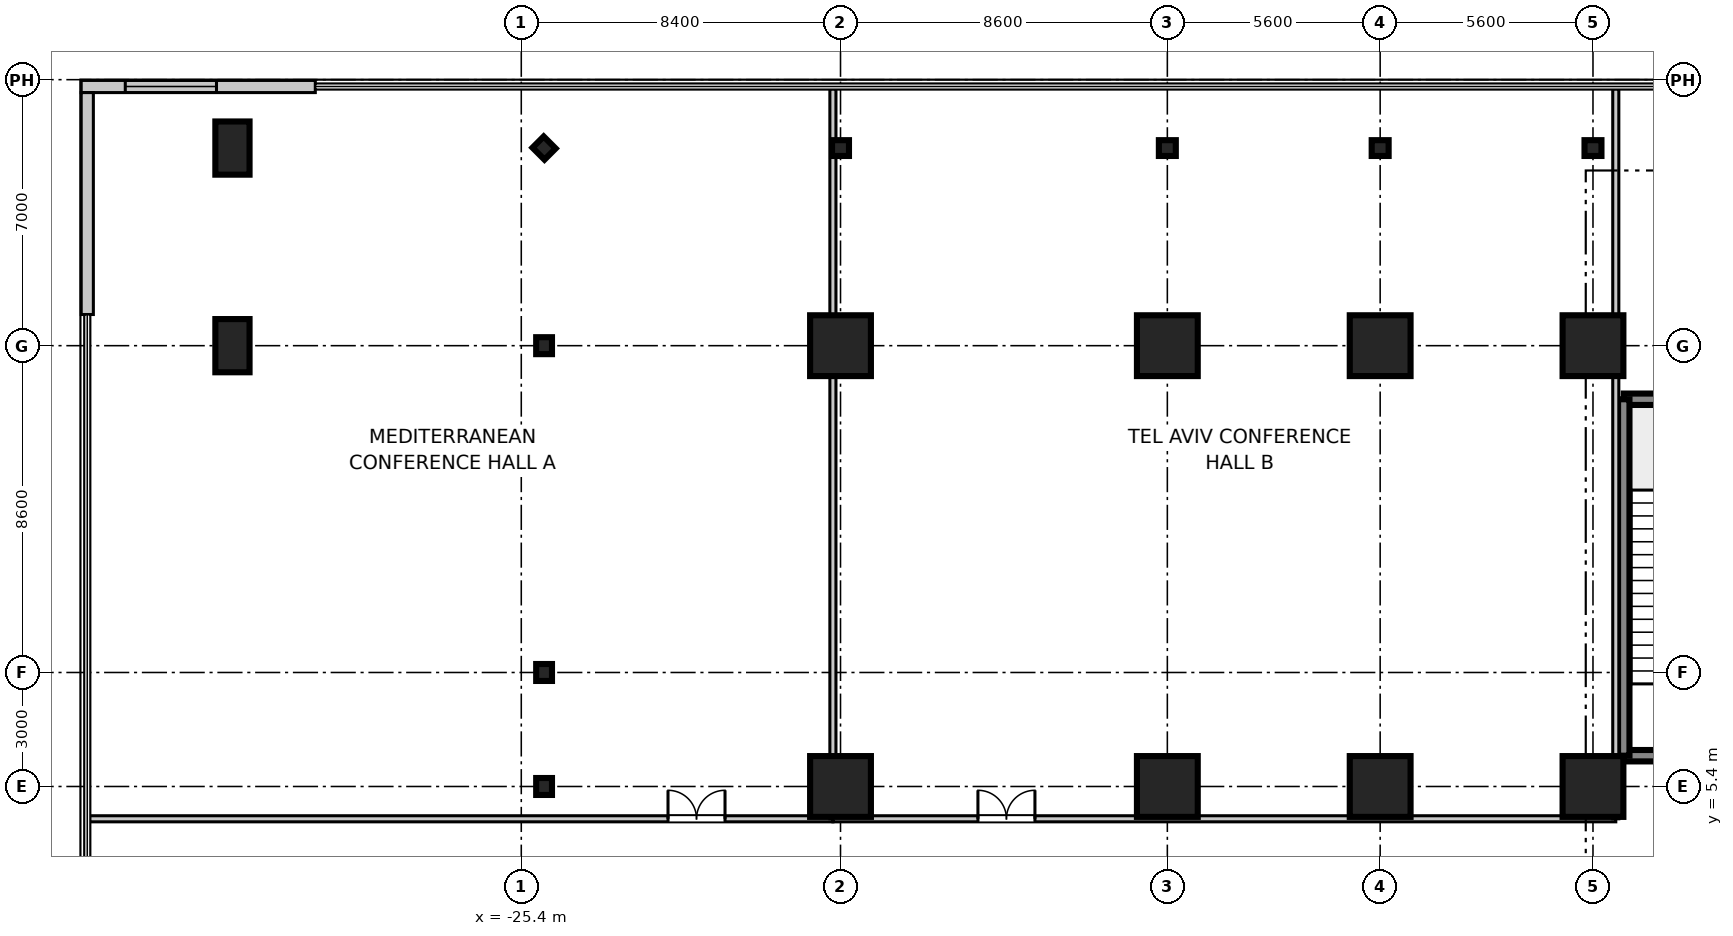
"""IFC4 building model, lengths in metres.
Left out: names, types, materials, properties, quantities, classifications, styles, units other than length and angle.
Written with IfcOpenShell. Run it as: python <this file> out.ifc"""

import sys

from ifc_helpers import new_model, si_unit, direction, frame, frame_2d, origin, origin_2d, place, context, subcontext, project, spatial, rectangle, i_section, extrude, source, transform, mapped, element, fill, save


model = new_model("IFC4")
c1 = context("Model", 3, precision=1e-05, world=origin(), true_north=direction((0.0, 1.0)))
c2 = subcontext(c1, "Body", "Model", "MODEL_VIEW")
j1 = project(units=[si_unit("LENGTHUNIT", "METRE"), si_unit("PLANEANGLEUNIT", "RADIAN")], contexts=[c1])
p1 = place(None, origin())
s1 = spatial("IfcSite", under=j1, at=p1, CompositionType="ELEMENT")
p2 = place(p1, origin())
s2 = spatial("IfcBuilding", under=s1, at=p2, CompositionType="ELEMENT")
p3 = place(p2, frame((0.0, 0.0, 10.8)))
s3 = spatial("IfcBuildingStorey", under=s2, at=p3, CompositionType="ELEMENT", Elevation=10.8)
m1 = source(origin(), c2, "Body", "SweptSolid", [
    extrude(rectangle(XDim=1.6, YDim=1.6, at=origin_2d()), origin(), (0.0, 0.0, 1.0), 5.355),
])
for number, where, z_axis, x_axis in (
    (1, (-17.0, 5.4, 0.0), (0.0, 0.0, 1.0), (1.0, 0.0, 0.0)),
    (2, (-17.0, 17.0, 0.0), (0.0, 0.0, 1.0), (1.0, 0.0, 0.0)),
    (3, (-8.4, 5.4, 0.0), (0.0, 0.0, 1.0), (1.0, 0.0, 0.0)),
    (4, (-8.4, 17.0, 0.0), (0.0, 0.0, 1.0), (1.0, 0.0, 0.0)),
    (5, (-2.8, 5.4, 0.0), (0.0, 0.0, 1.0), (1.0, 0.0, 0.0)),
    (6, (-2.8, 17.0, 0.0), (0.0, 0.0, 1.0), (1.0, 0.0, 0.0)),
    (7, (2.8, 5.4, 0.0), (0.0, 0.0, 1.0), (1.0, 0.0, 0.0)),
    (8, (2.8, 17.0, 0.0), (0.0, 0.0, 1.0), (1.0, 0.0, 0.0)),
):
    element("IfcColumn", number, at=place(p3, frame(where, z_axis=z_axis, x_axis=x_axis)), inside=s3, PredefinedType="COLUMN", context=c2, shape_type="MappedRepresentation", body=[
        mapped(m1, transform((0.0, 0.0, 0.0), scale=1.0)),
    ])
m2 = source(origin(), c2, "Body", "SweptSolid", [
    extrude(rectangle(XDim=0.9, YDim=1.4, at=origin_2d()), origin(), (0.0, 0.0, 1.0), 5.355),
])
for number, where, z_axis, x_axis in (
    (9, (-33.0, 17.0, 0.0), (0.0, 0.0, 1.0), (1.0, 0.0, 0.0)),
    (10, (-33.0, 22.2, 0.0), (0.0, 0.0, 1.0), (1.0, 0.0, 0.0)),
):
    element("IfcColumn", number, at=place(p3, frame(where, z_axis=z_axis, x_axis=x_axis)), inside=s3, PredefinedType="PILASTER", context=c2, shape_type="MappedRepresentation", body=[
        mapped(m2, transform((0.0, 0.0, 0.0), scale=1.0)),
    ])
m3 = source(origin(), c2, "Body", "SweptSolid", [
    extrude(i_section(OverallWidth=0.416, OverallDepth=0.446, WebThickness=0.025, FlangeThickness=0.04, at=origin_2d()), origin(), (0.0, 0.0, 1.0), 5.355),
])
for number, where, z_axis, x_axis in (
    (11, (-24.8, 5.4, 0.0), (0.0, 0.0, 1.0), (1.0, 0.0, 0.0)),
    (12, (-24.8, 8.4, 0.0), (0.0, 0.0, 1.0), (1.0, 0.0, 0.0)),
    (13, (-24.8, 17.0, 0.0), (0.0, 0.0, 1.0), (1.0, 0.0, 0.0)),
    (14, (-17.0, 22.2, 0.0), (0.0, 0.0, 1.0), (0.0, 1.0, 0.0)),
    (15, (-8.4, 22.2, 0.0), (0.0, 0.0, 1.0), (0.0, 1.0, 0.0)),
    (16, (-2.8, 22.2, 0.0), (0.0, 0.0, 1.0), (0.0, 1.0, 0.0)),
    (17, (2.8, 22.2, 0.0), (0.0, 0.0, 1.0), (0.0, 1.0, 0.0)),
    (18, (-24.8, 22.2, 0.0), (0.0, 0.0, 1.0), (0.707, 0.707, 0.0)),
):
    element("IfcColumn", number, at=place(p3, frame(where, z_axis=z_axis, x_axis=x_axis)), inside=s3, PredefinedType="COLUMN", context=c2, shape_type="MappedRepresentation", body=[
        mapped(m3, transform((0.0, 0.0, 0.0), scale=1.0)),
    ])
m4 = source(origin(), c2, "Body", "SweptSolid", [
    extrude(rectangle(XDim=3.98, YDim=0.3, at=frame_2d((1.99, 0.0))), origin(), (0.0, 0.0, 1.0), 5.06),
])
for number, where, z_axis, x_axis in (
    (19, (3.61, 6.21, 0.0), (0.0, 0.0, 1.0), (1.0, 0.0, 0.0)),
    (20, (3.61, 15.59, 0.0), (0.0, 0.0, 1.0), (1.0, 0.0, 0.0)),
):
    element("IfcWall", number, at=place(p3, frame(where, z_axis=z_axis, x_axis=x_axis)), inside=s3, PredefinedType="SHEAR", context=c2, shape_type="MappedRepresentation", body=[
        mapped(m4, transform((0.0, 0.0, 0.0), scale=1.0)),
    ])
m5 = source(origin(), c2, "Body", "SweptSolid", [
    extrude(rectangle(XDim=9.38, YDim=0.3, at=frame_2d((4.69, 0.0))), origin(), (0.0, 0.0, 1.0), 5.06),
])
p4 = place(p3, frame((3.61, 6.21, 0.0), z_axis=(0.0, 0.0, 1.0), x_axis=(0.0, 1.0, 0.0)))
e21 = element("IfcWall", 21, at=p4, inside=s3, PredefinedType="SHEAR", context=c2, shape_type="MappedRepresentation", body=[
    mapped(m5, transform((0.0, 0.0, 0.0), scale=1.0)),
])
m6 = source(origin(), c2, "Body", "SweptSolid", [
    extrude(rectangle(XDim=6.16, YDim=0.32, at=frame_2d((3.08, 0.0))), origin(), (0.0, 0.0, 1.0), 5.06),
])
p5 = place(p3, frame((-36.98, 23.82, 0.0), z_axis=(0.0, 0.0, 1.0), x_axis=(1.0, 0.0, 0.0)))
e22 = element("IfcWall", 22, at=p5, inside=s3, PredefinedType="STANDARD", context=c2, shape_type="MappedRepresentation", body=[
    mapped(m6, transform((0.0, 0.0, 0.0), scale=1.0)),
])
p6 = place(p5, frame((1.16, 0.0, 0.9)))
e23 = element("IfcOpeningElement", 23, at=p6, cuts=e22, PredefinedType="OPENING", context=c2, shape_type="SweptSolid", body=[
    extrude(rectangle(XDim=2.4, YDim=2.2, at=frame_2d((1.2, 1.1))), frame((0.0, 0.17, 0.0), z_axis=(0.0, -1.0, 0.0), x_axis=(1.0, 0.0, 0.0)), (0.0, 0.0, 1.0), 0.34),
])
m7 = source(origin(), c2, "Body", "SweptSolid", [
    extrude(rectangle(XDim=5.84, YDim=0.32, at=frame_2d((2.92, 0.0))), origin(), (0.0, 0.0, 1.0), 5.06),
])
p7 = place(p3, frame((-36.82, 17.82, 0.0), z_axis=(0.0, 0.0, 1.0), x_axis=(0.0, 1.0, 0.0)))
e24 = element("IfcWall", 24, at=p7, inside=s3, PredefinedType="STANDARD", context=c2, shape_type="MappedRepresentation", body=[
    mapped(m7, transform((0.0, 0.0, 0.0), scale=1.0)),
])
m8 = source(origin(), c2, "Body", "SweptSolid", [
    extrude(rectangle(XDim=19.56, YDim=0.16, at=frame_2d((9.78, 0.0))), origin(), (0.0, 0.0, 1.0), 3.4),
])
p8 = place(p3, frame((-36.76, 4.55, 0.0), z_axis=(0.0, 0.0, 1.0), x_axis=(1.0, 0.0, 0.0)))
e25 = element("IfcWall", 25, at=p8, inside=s3, PredefinedType="PARTITIONING", context=c2, shape_type="MappedRepresentation", body=[
    mapped(m8, transform((0.0, 0.0, 0.0), scale=1.0)),
])
p9 = place(p8, frame((15.221, 0.0, 0.0)))
e26 = element("IfcOpeningElement", 26, at=p9, cuts=e25, PredefinedType="OPENING", context=c2, shape_type="SweptSolid", body=[
    extrude(rectangle(XDim=1.5, YDim=2.15, at=frame_2d((0.75, 1.075))), frame((0.0, 0.09, 0.0), z_axis=(0.0, -1.0, 0.0), x_axis=(1.0, 0.0, 0.0)), (0.0, 0.0, 1.0), 0.18),
])
m9 = source(origin(), c2, "Body", "SweptSolid", [
    extrude(rectangle(XDim=19.21, YDim=0.16, at=frame_2d((9.605, 0.0))), origin(), (0.0, 0.0, 1.0), 3.4),
])
p10 = place(p3, frame((-17.2, 4.55, 0.0), z_axis=(0.0, 0.0, 1.0), x_axis=(0.0, 1.0, 0.0)))
e27 = element("IfcWall", 27, at=p10, inside=s3, PredefinedType="PARTITIONING", context=c2, shape_type="MappedRepresentation", body=[
    mapped(m9, transform((0.0, 0.0, 0.0), scale=1.0)),
])
m10 = source(origin(), c2, "Body", "SweptSolid", [
    extrude(rectangle(XDim=20.6, YDim=0.16, at=frame_2d((10.3, 0.0))), origin(), (0.0, 0.0, 1.0), 3.4),
])
p11 = place(p3, frame((-17.2, 4.55, 0.0), z_axis=(0.0, 0.0, 1.0), x_axis=(1.0, 0.0, 0.0)))
e28 = element("IfcWall", 28, at=p11, inside=s3, PredefinedType="PARTITIONING", context=c2, shape_type="MappedRepresentation", body=[
    mapped(m10, transform((0.0, 0.0, 0.0), scale=1.0)),
])
p12 = place(p11, frame((3.816, 0.0, 0.0)))
e29 = element("IfcOpeningElement", 29, at=p12, cuts=e28, PredefinedType="OPENING", context=c2, shape_type="SweptSolid", body=[
    extrude(rectangle(XDim=1.5, YDim=2.15, at=frame_2d((0.75, 1.075))), frame((0.0, 0.09, 0.0), z_axis=(0.0, -1.0, 0.0), x_axis=(1.0, 0.0, 0.0)), (0.0, 0.0, 1.0), 0.18),
])
p13 = place(p3, frame((3.4, 4.55, 0.0), z_axis=(0.0, 0.0, 1.0), x_axis=(0.0, 1.0, 0.0)))
e30 = element("IfcWall", 30, at=p13, inside=s3, PredefinedType="PARTITIONING", context=c2, shape_type="MappedRepresentation", body=[
    mapped(m9, transform((0.0, 0.0, 0.0), scale=1.0)),
])
m11 = source(origin(), c2, "Body", "SweptSolid", [
    extrude(rectangle(XDim=2.4, YDim=2.2, at=frame_2d((1.2, 1.1))), frame((0.0, 0.03, 0.0), z_axis=(0.0, -1.0, 0.0), x_axis=(1.0, 0.0, 0.0)), (0.0, 0.0, 1.0), 0.06),
])
p14 = place(p6, origin())
e31 = element("IfcWindow", 31, at=p14, inside=s3, PartitioningType="SINGLE_PANEL", PredefinedType="WINDOW", context=c2, shape_type="MappedRepresentation", body=[
    mapped(m11, transform((0.0, 0.0, 0.0), scale=1.0)),
])
fill(e23, e31)
m12 = source(origin(), c2, "Body", "SweptSolid", [
    extrude(rectangle(XDim=1.5, YDim=2.15, at=frame_2d((0.75, 1.075))), frame((0.0, 0.025, 0.0), z_axis=(0.0, -1.0, 0.0), x_axis=(1.0, 0.0, 0.0)), (0.0, 0.0, 1.0), 0.05),
])
p15 = place(p9, origin())
e32 = element("IfcDoor", 32, at=p15, inside=s3, OperationType="DOUBLE_DOOR_SINGLE_SWING", PredefinedType="DOOR", context=c2, shape_type="MappedRepresentation", body=[
    mapped(m12, transform((0.0, 0.0, 0.0), scale=1.0)),
])
fill(e26, e32)
p16 = place(p12, origin())
e33 = element("IfcDoor", 33, at=p16, inside=s3, OperationType="DOUBLE_DOOR_SINGLE_SWING", PredefinedType="DOOR", context=c2, shape_type="MappedRepresentation", body=[
    mapped(m12, transform((0.0, 0.0, 0.0), scale=1.0)),
])
fill(e29, e33)
save(model, sys.argv[1])
